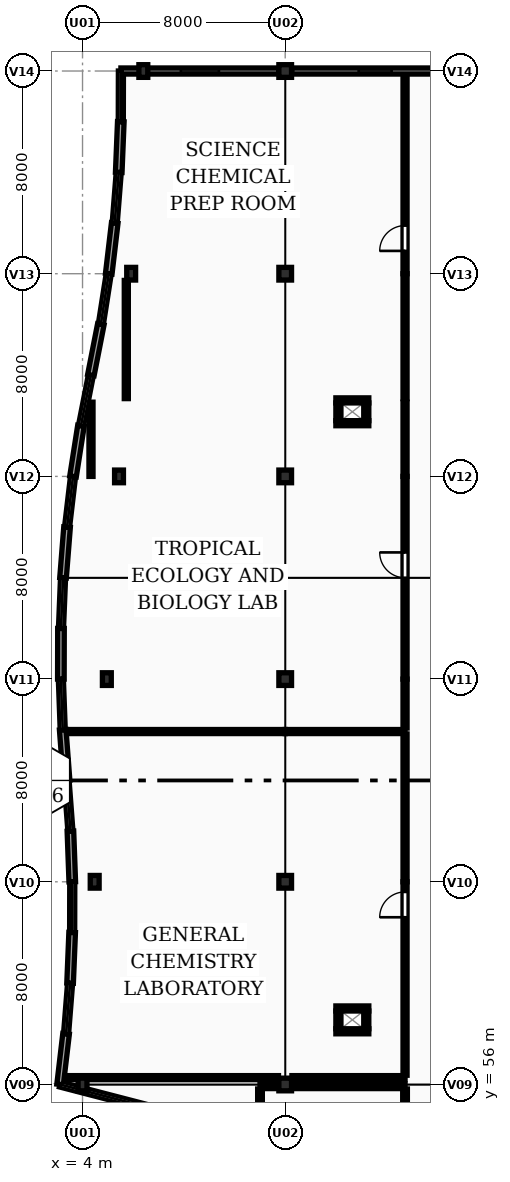
"""IFC4 building model, lengths in metres.
Left out: names, types, materials, properties, quantities, classifications, styles, units other than length and angle.
Written with IfcOpenShell. Run it as: python <this file> out.ifc"""

import sys

from ifc_helpers import new_model, si_unit, direction, frame, frame_2d, origin, origin_2d, place, context, subcontext, project, spatial, rectangle, extrude, element, fill, save


model = new_model("IFC4")
c1 = context("Model", 3, precision=1e-05, world=origin(), true_north=direction((0.0, 1.0)))
c2 = subcontext(c1, "Body", "Model", "MODEL_VIEW")
j1 = project(units=[si_unit("LENGTHUNIT", "METRE"), si_unit("PLANEANGLEUNIT", "RADIAN")], contexts=[c1])
p1 = place(None, origin())
s1 = spatial("IfcSite", under=j1, at=p1, CompositionType="ELEMENT")
p2 = place(p1, origin())
s2 = spatial("IfcBuilding", under=s1, at=p2, CompositionType="ELEMENT")
p3 = place(p2, frame((0.0, 0.0, 4.5)))
s3 = spatial("IfcBuildingStorey", under=s2, at=p3, CompositionType="ELEMENT", Elevation=4.5)
for number, where, z_axis, x_axis in (
    (1, (4.0, 56.0, 0.0), (0.0, 0.0, 1.0), (1.0, 0.0, 0.0)),
    (2, (4.48, 64.0, 0.0), (0.0, 0.0, 1.0), (1.0, 0.0, 0.0)),
    (3, (4.96, 72.0, 0.0), (0.0, 0.0, 1.0), (1.0, 0.0, 0.0)),
    (4, (5.44, 80.0, 0.0), (0.0, 0.0, 1.0), (1.0, 0.0, 0.0)),
    (5, (5.92, 88.0, 0.0), (0.0, 0.0, 1.0), (1.0, 0.0, 0.0)),
    (6, (6.4, 96.0, 0.0), (0.0, 0.0, 1.0), (1.0, 0.0, 0.0)),
):
    element("IfcColumn", number, at=place(p3, frame(where, z_axis=z_axis, x_axis=x_axis)), inside=s3, PredefinedType="PILASTER", context=c2, shape_type="SweptSolid", body=[
        extrude(rectangle(XDim=0.35, YDim=0.5, at=origin_2d()), origin(), (0.0, 0.0, 1.0), 3.9),
    ])
for number, where, z_axis, x_axis in (
    (7, (12.0, 56.0, 0.0), (0.0, 0.0, 1.0), (1.0, 0.0, 0.0)),
    (8, (12.0, 64.0, 0.0), (0.0, 0.0, 1.0), (1.0, 0.0, 0.0)),
    (9, (12.0, 72.0, 0.0), (0.0, 0.0, 1.0), (1.0, 0.0, 0.0)),
    (10, (12.0, 80.0, 0.0), (0.0, 0.0, 1.0), (1.0, 0.0, 0.0)),
    (11, (12.0, 88.0, 0.0), (0.0, 0.0, 1.0), (1.0, 0.0, 0.0)),
    (12, (12.0, 96.0, 0.0), (0.0, 0.0, 1.0), (1.0, 0.0, 0.0)),
):
    element("IfcColumn", number, at=place(p3, frame(where, z_axis=z_axis, x_axis=x_axis)), inside=s3, PredefinedType="COLUMN", context=c2, shape_type="SweptSolid", body=[
        extrude(rectangle(XDim=0.5, YDim=0.5, at=origin_2d()), origin(), (0.0, 0.0, 1.0), 3.9),
    ])
p4 = place(p3, frame((10.822, 54.0, 0.0), z_axis=(0.0, 0.0, 1.0), x_axis=(-0.967937555254, 0.251190941573, 0.0)))
e13 = element("IfcWall", 13, at=p4, inside=s3, PredefinedType="SOLIDWALL", context=c2, shape_type="SweptSolid", body=[
    extrude(rectangle(XDim=7.962, YDim=0.2, at=frame_2d((3.981, 0.0))), origin(), (0.0, 0.0, 1.0), 0.95),
])
p5 = place(p3, frame((3.115, 56.0, 0.0), z_axis=(0.0, 0.0, 1.0), x_axis=(0.116988959085, 0.99313321536, 0.0)))
e14 = element("IfcWall", 14, at=p5, inside=s3, PredefinedType="SOLIDWALL", context=c2, shape_type="SweptSolid", body=[
    extrude(rectangle(XDim=2.014, YDim=0.26, at=frame_2d((1.007, 0.0))), origin(), (0.0, 0.0, 1.0), 3.65),
])
p6 = place(p3, frame((3.351, 58.0, 0.0), z_axis=(0.0, 0.0, 1.0), x_axis=(0.078976178075, 0.996876503533, 0.0)))
e15 = element("IfcWall", 15, at=p6, inside=s3, PredefinedType="SOLIDWALL", context=c2, shape_type="SweptSolid", body=[
    extrude(rectangle(XDim=2.006, YDim=0.2, at=frame_2d((1.003, 0.0))), origin(), (0.0, 0.0, 1.0), 0.95),
])
p7 = place(p3, frame((3.509, 60.0, 0.0), z_axis=(0.0, 0.0, 1.0), x_axis=(0.040737639062, 0.99916987783, 0.0)))
e16 = element("IfcWall", 16, at=p7, inside=s3, PredefinedType="SOLIDWALL", context=c2, shape_type="SweptSolid", body=[
    extrude(rectangle(XDim=2.002, YDim=0.26, at=frame_2d((1.001, 0.0))), origin(), (0.0, 0.0, 1.0), 3.65),
])
p8 = place(p3, frame((3.591, 62.0, 0.0), z_axis=(0.0, 0.0, 1.0), x_axis=(0.002197260321, 0.999997586021, 0.0)))
e17 = element("IfcWall", 17, at=p8, inside=s3, PredefinedType="SOLIDWALL", context=c2, shape_type="SweptSolid", body=[
    extrude(rectangle(XDim=2.0, YDim=0.2, at=frame_2d((1.0, 0.0))), origin(), (0.0, 0.0, 1.0), 0.95),
])
p9 = place(p3, frame((3.595, 64.0, 0.0), z_axis=(0.0, 0.0, 1.0), x_axis=(-0.036596562065, 0.999330121454, 0.0)))
e18 = element("IfcWall", 18, at=p9, inside=s3, PredefinedType="SOLIDWALL", context=c2, shape_type="SweptSolid", body=[
    extrude(rectangle(XDim=2.001, YDim=0.26, at=frame_2d((1.0, 0.0))), origin(), (0.0, 0.0, 1.0), 3.65),
])
p10 = place(p3, frame((3.522, 66.0, 0.0), z_axis=(0.0, 0.0, 1.0), x_axis=(-0.075588789742, 0.997139074987, 0.0)))
e19 = element("IfcWall", 19, at=p10, inside=s3, PredefinedType="SOLIDWALL", context=c2, shape_type="SweptSolid", body=[
    extrude(rectangle(XDim=2.006, YDim=0.2, at=frame_2d((1.003, 0.0))), origin(), (0.0, 0.0, 1.0), 0.95),
])
p11 = place(p3, frame((3.37, 68.0, 0.0), z_axis=(0.0, 0.0, 1.0), x_axis=(-0.075709813676, 0.9971298933, 0.0)))
e20 = element("IfcWall", 20, at=p11, inside=s3, PredefinedType="SOLIDWALL", context=c2, shape_type="SweptSolid", body=[
    extrude(rectangle(XDim=2.006, YDim=0.26, at=frame_2d((1.003, 0.0))), origin(), (0.0, 0.0, 1.0), 3.65),
])
p12 = place(p3, frame((3.218, 70.0, 0.0), z_axis=(0.0, 0.0, 1.0), x_axis=(-0.036596562065, 0.999330121454, 0.0)))
e21 = element("IfcWall", 21, at=p12, inside=s3, PredefinedType="SOLIDWALL", context=c2, shape_type="SweptSolid", body=[
    extrude(rectangle(XDim=2.001, YDim=0.2, at=frame_2d((1.0, 0.0))), origin(), (0.0, 0.0, 1.0), 0.95),
])
p13 = place(p3, frame((3.145, 72.0, 0.0), z_axis=(0.0, 0.0, 1.0), x_axis=(0.002197260321, 0.999997586021, 0.0)))
e22 = element("IfcWall", 22, at=p13, inside=s3, PredefinedType="SOLIDWALL", context=c2, shape_type="SweptSolid", body=[
    extrude(rectangle(XDim=2.0, YDim=0.26, at=frame_2d((1.0, 0.0))), origin(), (0.0, 0.0, 1.0), 3.65),
])
p14 = place(p3, frame((3.149, 74.0, 0.0), z_axis=(0.0, 0.0, 1.0), x_axis=(0.040737639062, 0.99916987783, 0.0)))
e23 = element("IfcWall", 23, at=p14, inside=s3, PredefinedType="SOLIDWALL", context=c2, shape_type="SweptSolid", body=[
    extrude(rectangle(XDim=2.002, YDim=0.2, at=frame_2d((1.001, 0.0))), origin(), (0.0, 0.0, 1.0), 0.95),
])
p15 = place(p3, frame((3.231, 76.0, 0.0), z_axis=(0.0, 0.0, 1.0), x_axis=(0.078976178075, 0.996876503533, 0.0)))
e24 = element("IfcWall", 24, at=p15, inside=s3, PredefinedType="SOLIDWALL", context=c2, shape_type="SweptSolid", body=[
    extrude(rectangle(XDim=2.006, YDim=0.26, at=frame_2d((1.003, 0.0))), origin(), (0.0, 0.0, 1.0), 3.65),
])
p16 = place(p3, frame((3.389, 78.0, 0.0), z_axis=(0.0, 0.0, 1.0), x_axis=(0.116988959085, 0.99313321536, 0.0)))
e25 = element("IfcWall", 25, at=p16, inside=s3, PredefinedType="SOLIDWALL", context=c2, shape_type="SweptSolid", body=[
    extrude(rectangle(XDim=2.014, YDim=0.2, at=frame_2d((1.007, 0.0))), origin(), (0.0, 0.0, 1.0), 0.95),
])
p17 = place(p3, frame((3.625, 80.0, 0.0), z_axis=(0.0, 0.0, 1.0), x_axis=(0.15473004848, 0.987956786554, 0.0)))
e26 = element("IfcWall", 26, at=p17, inside=s3, PredefinedType="SOLIDWALL", context=c2, shape_type="SweptSolid", body=[
    extrude(rectangle(XDim=2.024, YDim=0.26, at=frame_2d((1.012, 0.0))), origin(), (0.0, 0.0, 1.0), 3.65),
])
p18 = place(p3, frame((3.938, 82.0, 0.0), z_axis=(0.0, 0.0, 1.0), x_axis=(0.192267434085, 0.981342566992, 0.0)))
e27 = element("IfcWall", 27, at=p18, inside=s3, PredefinedType="SOLIDWALL", context=c2, shape_type="SweptSolid", body=[
    extrude(rectangle(XDim=2.038, YDim=0.2, at=frame_2d((1.019, 0.0))), origin(), (0.0, 0.0, 1.0), 0.95),
])
p19 = place(p3, frame((4.33, 84.0, 0.0), z_axis=(0.0, 0.0, 1.0), x_axis=(0.192152065658, 0.981365163262, 0.0)))
e28 = element("IfcWall", 28, at=p19, inside=s3, PredefinedType="SOLIDWALL", context=c2, shape_type="SweptSolid", body=[
    extrude(rectangle(XDim=2.038, YDim=0.26, at=frame_2d((1.019, 0.0))), origin(), (0.0, 0.0, 1.0), 3.65),
])
p20 = place(p3, frame((4.722, 86.0, 0.0), z_axis=(0.0, 0.0, 1.0), x_axis=(0.15473004848, 0.987956786554, 0.0)))
e29 = element("IfcWall", 29, at=p20, inside=s3, PredefinedType="SOLIDWALL", context=c2, shape_type="SweptSolid", body=[
    extrude(rectangle(XDim=2.024, YDim=0.2, at=frame_2d((1.012, 0.0))), origin(), (0.0, 0.0, 1.0), 0.95),
])
p21 = place(p3, frame((5.035, 88.0, 0.0), z_axis=(0.0, 0.0, 1.0), x_axis=(0.116988959085, 0.99313321536, 0.0)))
e30 = element("IfcWall", 30, at=p21, inside=s3, PredefinedType="SOLIDWALL", context=c2, shape_type="SweptSolid", body=[
    extrude(rectangle(XDim=2.014, YDim=0.26, at=frame_2d((1.007, 0.0))), origin(), (0.0, 0.0, 1.0), 3.65),
])
p22 = place(p3, frame((5.271, 90.0, 0.0), z_axis=(0.0, 0.0, 1.0), x_axis=(0.079097106354, 0.996866915775, 0.0)))
e31 = element("IfcWall", 31, at=p22, inside=s3, PredefinedType="SOLIDWALL", context=c2, shape_type="SweptSolid", body=[
    extrude(rectangle(XDim=2.006, YDim=0.2, at=frame_2d((1.003, 0.0))), origin(), (0.0, 0.0, 1.0), 0.95),
])
p23 = place(p3, frame((5.429, 92.0, 0.0), z_axis=(0.0, 0.0, 1.0), x_axis=(0.04061587159, 0.999174835039, 0.0)))
e32 = element("IfcWall", 32, at=p23, inside=s3, PredefinedType="SOLIDWALL", context=c2, shape_type="SweptSolid", body=[
    extrude(rectangle(XDim=2.002, YDim=0.26, at=frame_2d((1.001, 0.0))), origin(), (0.0, 0.0, 1.0), 3.65),
])
p24 = place(p3, frame((5.51, 94.0, 0.0), z_axis=(0.0, 0.0, 1.0), x_axis=(0.002197260321, 0.999997586021, 0.0)))
e33 = element("IfcWall", 33, at=p24, inside=s3, PredefinedType="SOLIDWALL", context=c2, shape_type="SweptSolid", body=[
    extrude(rectangle(XDim=2.0, YDim=0.2, at=frame_2d((1.0, 0.0))), origin(), (0.0, 0.0, 1.0), 0.95),
])
p25 = place(p3, frame((5.515, 96.0, 0.0), z_axis=(0.0, 0.0, 1.0), x_axis=(1.0, 0.0, 0.0)))
e34 = element("IfcWall", 34, at=p25, inside=s3, PredefinedType="SOLIDWALL", context=c2, shape_type="SweptSolid", body=[
    extrude(rectangle(XDim=6.235, YDim=0.24, at=frame_2d((3.118, 0.0))), origin(), (0.0, 0.0, 1.0), 3.0),
])
p26 = place(p25, frame((2.367, 0.0, 0.95)))
e35 = element("IfcOpeningElement", 35, at=p26, cuts=e34, PredefinedType="OPENING", context=c2, shape_type="SweptSolid", body=[
    extrude(rectangle(XDim=1.5, YDim=1.2, at=frame_2d((0.75, 0.6))), frame((0.0, 0.13, 0.0), z_axis=(0.0, -1.0, 0.0), x_axis=(1.0, 0.0, 0.0)), (0.0, 0.0, 1.0), 0.26),
])
p27 = place(p3, frame((12.25, 96.0, 0.0), z_axis=(0.0, 0.0, 1.0), x_axis=(1.0, 0.0, 0.0)))
e36 = element("IfcWall", 36, at=p27, inside=s3, PredefinedType="SOLIDWALL", context=c2, shape_type="SweptSolid", body=[
    extrude(rectangle(XDim=7.5, YDim=0.24, at=frame_2d((3.75, 0.0))), origin(), (0.0, 0.0, 1.0), 3.0),
])
p28 = place(p27, frame((2.65, 0.0, 0.95)))
e37 = element("IfcOpeningElement", 37, at=p28, cuts=e36, PredefinedType="OPENING", context=c2, shape_type="SweptSolid", body=[
    extrude(rectangle(XDim=1.3, YDim=1.4, at=frame_2d((0.65, 0.7))), frame((0.0, 0.13, 0.0), z_axis=(0.0, -1.0, 0.0), x_axis=(1.0, 0.0, 0.0)), (0.0, 0.0, 1.0), 0.26),
])
for number, where, z_axis, x_axis in (
    (38, (15.3, 58.1, 0.0), (0.0, 0.0, 1.0), (-1.0, 0.0, 0.0)),
    (39, (14.0, 59.0, 0.0), (0.0, 0.0, 1.0), (1.0, 0.0, 0.0)),
):
    element("IfcWall", number, at=place(p3, frame(where, z_axis=z_axis, x_axis=x_axis)), inside=s3, PredefinedType="PARTITIONING", context=c2, shape_type="SweptSolid", body=[
        extrude(rectangle(XDim=1.3, YDim=0.2, at=frame_2d((0.65, 0.0))), origin(), (0.0, 0.0, 1.0), 3.65),
    ])
for number, where, z_axis, x_axis in (
    (40, (14.1, 58.2, 0.0), (0.0, 0.0, 1.0), (0.0, 1.0, 0.0)),
    (41, (15.2, 58.9, 0.0), (0.0, 0.0, 1.0), (0.0, -1.0, 0.0)),
):
    element("IfcWall", number, at=place(p3, frame(where, z_axis=z_axis, x_axis=x_axis)), inside=s3, PredefinedType="PARTITIONING", context=c2, shape_type="SweptSolid", body=[
        extrude(rectangle(XDim=0.7, YDim=0.2, at=frame_2d((0.35, 0.0))), origin(), (0.0, 0.0, 1.0), 3.65),
    ])
for number, where, z_axis, x_axis in (
    (42, (15.3, 82.1, 0.0), (0.0, 0.0, 1.0), (-1.0, 0.0, 0.0)),
    (43, (14.0, 83.0, 0.0), (0.0, 0.0, 1.0), (1.0, 0.0, 0.0)),
):
    element("IfcWall", number, at=place(p3, frame(where, z_axis=z_axis, x_axis=x_axis)), inside=s3, PredefinedType="PARTITIONING", context=c2, shape_type="SweptSolid", body=[
        extrude(rectangle(XDim=1.3, YDim=0.2, at=frame_2d((0.65, 0.0))), origin(), (0.0, 0.0, 1.0), 3.65),
    ])
for number, where, z_axis, x_axis in (
    (44, (14.1, 82.2, 0.0), (0.0, 0.0, 1.0), (0.0, 1.0, 0.0)),
    (45, (15.2, 82.9, 0.0), (0.0, 0.0, 1.0), (0.0, -1.0, 0.0)),
):
    element("IfcWall", number, at=place(p3, frame(where, z_axis=z_axis, x_axis=x_axis)), inside=s3, PredefinedType="PARTITIONING", context=c2, shape_type="SweptSolid", body=[
        extrude(rectangle(XDim=0.7, YDim=0.2, at=frame_2d((0.35, 0.0))), origin(), (0.0, 0.0, 1.0), 3.65),
    ])
p29 = place(p3, frame((3.319, 56.27, 0.0), z_axis=(0.0, 0.0, 1.0), x_axis=(1.0, 0.0, 0.0)))
e46 = element("IfcWall", 46, at=p29, inside=s3, PredefinedType="PARTITIONING", context=c2, shape_type="SweptSolid", body=[
    extrude(rectangle(XDim=8.416, YDim=0.16, at=frame_2d((4.208, 0.0))), origin(), (0.0, 0.0, 1.0), 3.0),
])
p30 = place(p3, frame((12.265, 56.27, 0.0), z_axis=(0.0, 0.0, 1.0), x_axis=(1.0, 0.0, 0.0)))
e47 = element("IfcWall", 47, at=p30, inside=s3, PredefinedType="PARTITIONING", context=c2, shape_type="SweptSolid", body=[
    extrude(rectangle(XDim=4.465, YDim=0.16, at=frame_2d((2.232, 0.0))), origin(), (0.0, 0.0, 1.0), 3.0),
])
p31 = place(p3, frame((3.396, 69.93, 0.0), z_axis=(0.0, 0.0, 1.0), x_axis=(1.0, 0.0, 0.0)))
e48 = element("IfcWall", 48, at=p31, inside=s3, PredefinedType="PARTITIONING", context=c2, shape_type="SweptSolid", body=[
    extrude(rectangle(XDim=8.604, YDim=0.16, at=frame_2d((4.302, 0.0))), origin(), (0.0, 0.0, 1.0), 3.65),
])
p32 = place(p3, frame((12.0, 69.93, 0.0), z_axis=(0.0, 0.0, 1.0), x_axis=(1.0, 0.0, 0.0)))
e49 = element("IfcWall", 49, at=p32, inside=s3, PredefinedType="PARTITIONING", context=c2, shape_type="SweptSolid", body=[
    extrude(rectangle(XDim=4.73, YDim=0.16, at=frame_2d((2.365, 0.0))), origin(), (0.0, 0.0, 1.0), 3.65),
])
p33 = place(p3, frame((16.73, 56.365, 0.0), z_axis=(0.0, 0.0, 1.0), x_axis=(0.0, 1.0, 0.0)))
e50 = element("IfcWall", 50, at=p33, inside=s3, PredefinedType="PARTITIONING", context=c2, shape_type="SweptSolid", body=[
    extrude(rectangle(XDim=7.635, YDim=0.16, at=frame_2d((3.817, 0.0))), origin(), (0.0, 0.0, 1.0), 3.65),
])
p34 = place(p33, frame((6.235, 0.0, 0.0)))
e51 = element("IfcOpeningElement", 51, at=p34, cuts=e50, PredefinedType="OPENING", context=c2, shape_type="SweptSolid", body=[
    extrude(rectangle(XDim=1.0, YDim=2.15, at=frame_2d((0.5, 1.075))), frame((0.0, 0.09, 0.0), z_axis=(0.0, -1.0, 0.0), x_axis=(1.0, 0.0, 0.0)), (0.0, 0.0, 1.0), 0.18),
])
p35 = place(p3, frame((16.73, 64.0, 0.0), z_axis=(0.0, 0.0, 1.0), x_axis=(0.0, 1.0, 0.0)))
e52 = element("IfcWall", 52, at=p35, inside=s3, PredefinedType="PARTITIONING", context=c2, shape_type="SweptSolid", body=[
    extrude(rectangle(XDim=5.835, YDim=0.16, at=frame_2d((2.917, 0.0))), origin(), (0.0, 0.0, 1.0), 3.65),
])
p36 = place(p3, frame((4.334, 80.0, 0.0), z_axis=(0.0, 0.0, 1.0), x_axis=(0.0, 1.0, 0.0)))
e53 = element("IfcWall", 53, at=p36, inside=s3, PredefinedType="PARTITIONING", context=c2, shape_type="SweptSolid", body=[
    extrude(rectangle(XDim=2.93, YDim=0.16, at=frame_2d((1.465, 0.0))), origin(), (0.0, 0.0, 1.0), 3.65),
])
p37 = place(p3, frame((16.73, 70.07, 0.0), z_axis=(0.0, 0.0, 1.0), x_axis=(0.0, 1.0, 0.0)))
e54 = element("IfcWall", 54, at=p37, inside=s3, PredefinedType="PARTITIONING", context=c2, shape_type="SweptSolid", body=[
    extrude(rectangle(XDim=1.93, YDim=0.16, at=frame_2d((0.965, 0.0))), origin(), (0.0, 0.0, 1.0), 3.65),
])
p38 = place(p3, frame((16.73, 72.0, 0.0), z_axis=(0.0, 0.0, 1.0), x_axis=(0.0, 1.0, 0.0)))
e55 = element("IfcWall", 55, at=p38, inside=s3, PredefinedType="PARTITIONING", context=c2, shape_type="SweptSolid", body=[
    extrude(rectangle(XDim=8.0, YDim=0.16, at=frame_2d((4.0, 0.0))), origin(), (0.0, 0.0, 1.0), 3.65),
])
p39 = place(p38, frame((4.0, 0.0, 0.0)))
e56 = element("IfcOpeningElement", 56, at=p39, cuts=e55, PredefinedType="OPENING", context=c2, shape_type="SweptSolid", body=[
    extrude(rectangle(XDim=1.0, YDim=2.15, at=frame_2d((0.5, 1.075))), frame((0.0, 0.09, 0.0), z_axis=(0.0, -1.0, 0.0), x_axis=(1.0, 0.0, 0.0)), (0.0, 0.0, 1.0), 0.18),
])
p40 = place(p3, frame((16.73, 80.0, 0.0), z_axis=(0.0, 0.0, 1.0), x_axis=(0.0, 1.0, 0.0)))
e57 = element("IfcWall", 57, at=p40, inside=s3, PredefinedType="PARTITIONING", context=c2, shape_type="SweptSolid", body=[
    extrude(rectangle(XDim=2.93, YDim=0.16, at=frame_2d((1.465, 0.0))), origin(), (0.0, 0.0, 1.0), 3.65),
])
p41 = place(p3, frame((5.728, 83.07, 0.0), z_axis=(0.0, 0.0, 1.0), x_axis=(0.0, 1.0, 0.0)))
e58 = element("IfcWall", 58, at=p41, inside=s3, PredefinedType="PARTITIONING", context=c2, shape_type="SweptSolid", body=[
    extrude(rectangle(XDim=4.665, YDim=0.16, at=frame_2d((2.333, 0.0))), origin(), (0.0, 0.0, 1.0), 2.95),
])
p42 = place(p3, frame((16.73, 83.07, 0.0), z_axis=(0.0, 0.0, 1.0), x_axis=(0.0, 1.0, 0.0)))
e59 = element("IfcWall", 59, at=p42, inside=s3, PredefinedType="PARTITIONING", context=c2, shape_type="SweptSolid", body=[
    extrude(rectangle(XDim=4.93, YDim=0.16, at=frame_2d((2.465, 0.0))), origin(), (0.0, 0.0, 1.0), 3.65),
])
p43 = place(p3, frame((16.73, 88.0, 0.0), z_axis=(0.0, 0.0, 1.0), x_axis=(0.0, 1.0, 0.0)))
e60 = element("IfcWall", 60, at=p43, inside=s3, PredefinedType="PARTITIONING", context=c2, shape_type="SweptSolid", body=[
    extrude(rectangle(XDim=7.838, YDim=0.16, at=frame_2d((3.919, 0.0))), origin(), (0.0, 0.0, 1.0), 3.65),
])
p44 = place(p43, frame((0.9, 0.0, 0.0)))
e61 = element("IfcOpeningElement", 61, at=p44, cuts=e60, PredefinedType="OPENING", context=c2, shape_type="SweptSolid", body=[
    extrude(rectangle(XDim=1.0, YDim=2.15, at=frame_2d((0.5, 1.075))), frame((0.0, 0.09, 0.0), z_axis=(0.0, -1.0, 0.0), x_axis=(1.0, 0.0, 0.0)), (0.0, 0.0, 1.0), 0.18),
])
p45 = place(p3, frame((11.005, 55.93, 0.0), z_axis=(0.0, 0.0, 1.0), x_axis=(1.0, 0.0, 0.0)))
e62 = element("IfcWall", 62, at=p45, inside=s3, PredefinedType="PARTITIONING", context=c2, shape_type="SweptSolid", body=[
    extrude(rectangle(XDim=5.725, YDim=0.185, at=frame_2d((2.863, 0.0))), origin(), (0.0, 0.0, 1.0), 3.0),
])
p46 = place(p3, frame((11.005, 54.02, 0.0), z_axis=(0.0, 0.0, 1.0), x_axis=(0.0, 1.0, 0.0)))
e63 = element("IfcWall", 63, at=p46, inside=s3, PredefinedType="PARTITIONING", context=c2, shape_type="SweptSolid", body=[
    extrude(rectangle(XDim=1.802, YDim=0.185, at=frame_2d((0.901, 0.0))), origin(), (0.0, 0.0, 1.0), 3.65),
])
p47 = place(p3, frame((16.73, 50.0, 0.0), z_axis=(0.0, 0.0, 1.0), x_axis=(0.0, 1.0, 0.0)))
e64 = element("IfcWall", 64, at=p47, inside=s3, PredefinedType="PARTITIONING", context=c2, shape_type="SweptSolid", body=[
    extrude(rectangle(XDim=5.823, YDim=0.185, at=frame_2d((2.911, 0.0))), origin(), (0.0, 0.0, 1.0), 3.65),
])
p48 = place(p47, frame((2.54, 0.0, 0.0)))
e65 = element("IfcOpeningElement", 65, at=p48, cuts=e64, PredefinedType="OPENING", context=c2, shape_type="SweptSolid", body=[
    extrude(rectangle(XDim=0.92, YDim=2.2, at=frame_2d((0.46, 1.1))), frame((0.0, 0.103, 0.0), z_axis=(0.0, -1.0, 0.0), x_axis=(1.0, 0.0, 0.0)), (0.0, 0.0, 1.0), 0.205),
])
p49 = place(p26, origin())
e66 = element("IfcWindow", 66, at=p49, inside=s3, PartitioningType="SINGLE_PANEL", PredefinedType="WINDOW", context=c2, shape_type="SweptSolid", body=[
    extrude(rectangle(XDim=1.5, YDim=1.2, at=frame_2d((0.75, 0.6))), frame((0.0, 0.03, 0.0), z_axis=(0.0, -1.0, 0.0), x_axis=(1.0, 0.0, 0.0)), (0.0, 0.0, 1.0), 0.06),
])
fill(e35, e66)
p50 = place(p28, origin())
e67 = element("IfcWindow", 67, at=p50, inside=s3, PartitioningType="SINGLE_PANEL", PredefinedType="WINDOW", context=c2, shape_type="SweptSolid", body=[
    extrude(rectangle(XDim=1.3, YDim=1.4, at=frame_2d((0.65, 0.7))), frame((0.0, 0.03, 0.0), z_axis=(0.0, -1.0, 0.0), x_axis=(1.0, 0.0, 0.0)), (0.0, 0.0, 1.0), 0.06),
])
fill(e37, e67)
p51 = place(p34, origin())
e68 = element("IfcDoor", 68, at=p51, inside=s3, OperationType="SINGLE_SWING_LEFT", PredefinedType="DOOR", context=c2, shape_type="SweptSolid", body=[
    extrude(rectangle(XDim=1.0, YDim=2.15, at=frame_2d((0.5, 1.075))), frame((0.0, 0.025, 0.0), z_axis=(0.0, -1.0, 0.0), x_axis=(1.0, 0.0, 0.0)), (0.0, 0.0, 1.0), 0.05),
])
fill(e51, e68)
p52 = place(p39, origin())
e69 = element("IfcDoor", 69, at=p52, inside=s3, OperationType="SINGLE_SWING_RIGHT", PredefinedType="DOOR", context=c2, shape_type="SweptSolid", body=[
    extrude(rectangle(XDim=1.0, YDim=2.15, at=frame_2d((0.5, 1.075))), frame((0.0, 0.025, 0.0), z_axis=(0.0, -1.0, 0.0), x_axis=(1.0, 0.0, 0.0)), (0.0, 0.0, 1.0), 0.05),
])
fill(e56, e69)
p53 = place(p44, origin())
e70 = element("IfcDoor", 70, at=p53, inside=s3, OperationType="SINGLE_SWING_LEFT", PredefinedType="DOOR", context=c2, shape_type="SweptSolid", body=[
    extrude(rectangle(XDim=1.0, YDim=2.15, at=frame_2d((0.5, 1.075))), frame((0.0, 0.025, 0.0), z_axis=(0.0, -1.0, 0.0), x_axis=(1.0, 0.0, 0.0)), (0.0, 0.0, 1.0), 0.05),
])
fill(e61, e70)
save(model, sys.argv[1])
